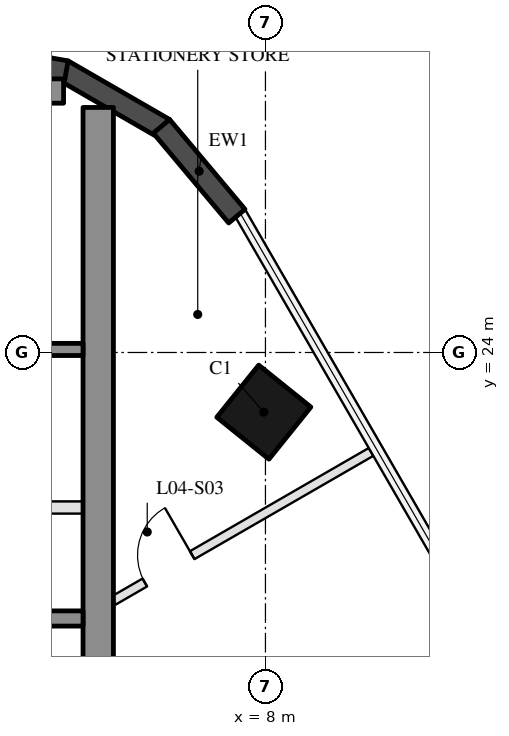
"""IFC4 building model, lengths in metres.
Left out: names, types, materials, properties, quantities, classifications, styles, units other than length and angle.
Written with IfcOpenShell. Run it as: python <this file> out.ifc"""

import sys

from ifc_helpers import new_model, si_unit, direction, frame, frame_2d, origin, origin_2d, place, context, subcontext, project, spatial, rectangle, hollow_rectangle, extrude, boolean, halfspace, element, fill, save


model = new_model("IFC4")
c1 = context("Model", 3, precision=1e-05, world=origin(), true_north=direction((0.0, 1.0)))
c2 = subcontext(c1, "Body", "Model", "MODEL_VIEW")
j1 = project(units=[si_unit("LENGTHUNIT", "METRE"), si_unit("PLANEANGLEUNIT", "RADIAN")], contexts=[c1])
p1 = place(None, origin())
s1 = spatial("IfcSite", under=j1, at=p1, CompositionType="ELEMENT")
p2 = place(p1, origin())
s2 = spatial("IfcBuilding", under=s1, at=p2, CompositionType="ELEMENT")
p3 = place(p2, frame((0.0, 0.0, 28.5)))
s3 = spatial("IfcBuildingStorey", under=s2, at=p3, CompositionType="ELEMENT", Elevation=28.5)
p4 = place(p3, frame((7.973, 23.019, 0.0), z_axis=(-0.014257598898, -0.036701119596, 0.999224573704), x_axis=(-0.499479314293, 0.865974198785, 0.024679984425)))
e1 = element("IfcColumn", 1, at=p4, inside=s3, PredefinedType="COLUMN", context=c2, shape_type="SweptSolid", body=[
    boolean("DIFFERENCE", boolean("DIFFERENCE", extrude(hollow_rectangle(XDim=1.1, YDim=1.1, WallThickness=0.05, at=origin_2d()), origin(), (0.0, 0.0, 1.0), 4.503), halfspace(frame((0.0, 0.0, 0.013), z_axis=(0.0, 0.0, 1.0), x_axis=(1.0, 0.0, 0.0)), True)), halfspace(frame((0.0, 0.0, 4.491), z_axis=(0.0, 0.0, 1.0), x_axis=(1.0, 0.0, 0.0)), False)),
])
p5 = place(p3, frame((6.337, 27.681, 0.0), z_axis=(0.0, 0.0, 1.0), x_axis=(-0.866052736899, 0.499952654668, 0.0)))
e2 = element("IfcWall", 2, at=p5, inside=s3, PredefinedType="SOLIDWALL", context=c2, shape_type="SweptSolid", body=[
    extrude(rectangle(XDim=1.928, YDim=0.35, at=frame_2d((0.964, 0.0))), origin(), (0.0, 0.0, 1.0), 4.2),
])
p6 = place(p3, frame((4.724, 28.624, 0.0), z_axis=(0.0, 0.0, 1.0), x_axis=(-0.98481795522, 0.173590308126, 0.0)))
e3 = element("IfcWall", 3, at=p6, inside=s3, PredefinedType="SOLIDWALL", context=c2, shape_type="SweptSolid", body=[
    extrude(rectangle(XDim=1.928, YDim=0.35, at=frame_2d((0.964, 0.0))), origin(), (0.0, 0.0, 1.0), 4.2),
])
p7 = place(p3, frame((7.529, 26.243, 0.0), z_axis=(0.0, 0.0, 1.0), x_axis=(-0.642746534531, 0.76607890739, 0.0)))
e4 = element("IfcWall", 4, at=p7, inside=s3, PredefinedType="SOLIDWALL", context=c2, shape_type="SweptSolid", body=[
    extrude(rectangle(XDim=1.928, YDim=0.35, at=frame_2d((0.964, 0.0))), origin(), (0.0, 0.0, 1.0), 4.2),
])
p8 = place(p3, frame((5.25, 12.9, 0.0), z_axis=(0.0, 0.0, 1.0), x_axis=(0.0, 1.0, 0.0)))
e5 = element("IfcWall", 5, at=p8, inside=s3, PredefinedType="SHEAR", context=c2, shape_type="SweptSolid", body=[
    extrude(rectangle(XDim=15.13, YDim=0.5, at=frame_2d((7.565, 0.0))), origin(), (0.0, 0.0, 1.0), 4.2),
])
p9 = place(p3, frame((4.68, 28.3, 0.0), z_axis=(0.0, 0.0, 1.0), x_axis=(-1.0, 0.0, 0.0)))
e6 = element("IfcWall", 6, at=p9, inside=s3, PredefinedType="SHEAR", context=c2, shape_type="SweptSolid", body=[
    extrude(rectangle(XDim=3.08, YDim=0.4, at=frame_2d((1.54, 0.0))), origin(), (0.0, 0.0, 1.0), 4.2),
])
p10 = place(p3, frame((5.0, 19.625, 0.0), z_axis=(0.0, 0.0, 1.0), x_axis=(-1.0, 0.0, 0.0)))
e7 = element("IfcWall", 7, at=p10, inside=s3, PredefinedType="SHEAR", context=c2, shape_type="SweptSolid", body=[
    extrude(rectangle(XDim=2.55, YDim=0.25, at=frame_2d((1.275, 0.0))), origin(), (0.0, 0.0, 1.0), 4.2),
])
p11 = place(p3, frame((5.0, 24.05, 0.0), z_axis=(0.0, 0.0, 1.0), x_axis=(-1.0, 0.0, 0.0)))
e8 = element("IfcWall", 8, at=p11, inside=s3, PredefinedType="SHEAR", context=c2, shape_type="SweptSolid", body=[
    extrude(rectangle(XDim=2.4, YDim=0.2, at=frame_2d((1.2, 0.0))), origin(), (0.0, 0.0, 1.0), 4.2),
])
p12 = place(p3, frame((5.0, 21.45, 0.0), z_axis=(0.0, 0.0, 1.0), x_axis=(-1.0, 0.0, 0.0)))
e9 = element("IfcWall", 9, at=p12, inside=s3, PredefinedType="PARTITIONING", context=c2, shape_type="SweptSolid", body=[
    extrude(rectangle(XDim=2.4, YDim=0.2, at=frame_2d((1.2, 0.0))), origin(), (0.0, 0.0, 1.0), 4.2),
])
p13 = place(p3, frame((9.737, 22.365, 0.0), z_axis=(0.0, 0.0, 1.0), x_axis=(-0.866020200517, -0.500009012216, 0.0)))
e10 = element("IfcWall", 10, at=p13, inside=s3, PredefinedType="PARTITIONING", context=c2, shape_type="SweptSolid", body=[
    extrude(rectangle(XDim=4.892, YDim=0.15, at=frame_2d((2.446, 0.0))), origin(), (0.0, 0.0, 1.0), 3.6),
])
p14 = place(p13, frame((3.396, 0.0, 0.0)))
e11 = element("IfcOpeningElement", 11, at=p14, cuts=e10, PredefinedType="OPENING", context=c2, shape_type="SweptSolid", body=[
    extrude(rectangle(XDim=0.9, YDim=2.1, at=frame_2d((0.45, 1.05))), frame((0.0, 0.085, 0.0), z_axis=(0.0, -1.0, 0.0), x_axis=(1.0, 0.0, 0.0)), (0.0, 0.0, 1.0), 0.17),
])
p15 = place(p14, frame((0.9, 0.0, 0.0), z_axis=(0.0, 0.0, 1.0), x_axis=(-1.0, 0.0, 0.0)))
e12 = element("IfcDoor", 12, at=p15, inside=s3, OperationType="SINGLE_SWING_RIGHT", PredefinedType="DOOR", context=c2, shape_type="SweptSolid", body=[
    extrude(rectangle(XDim=0.9, YDim=2.1, at=frame_2d((0.45, 1.05))), frame((0.0, 0.025, 0.0), z_axis=(0.0, -1.0, 0.0), x_axis=(1.0, 0.0, 0.0)), (0.0, 0.0, 1.0), 0.05),
])
fill(e11, e12)
save(model, sys.argv[1])
